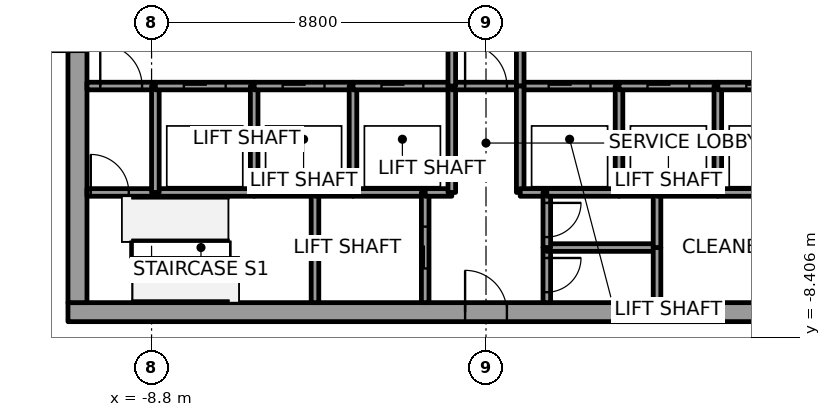
"""IFC4 building model, lengths in metres.
Left out: names, types, materials, properties, quantities, classifications, styles, units other than length and angle.
Written with IfcOpenShell. Run it as: python <this file> out.ifc"""

import sys

from ifc_helpers import new_model, si_unit, direction, frame, frame_2d, origin, place, context, subcontext, project, spatial, rectangle, extrude, element, fill, save


model = new_model("IFC4")
c1 = context("Model", 3, precision=1e-05, world=origin(), true_north=direction((0.0, 1.0)))
c2 = subcontext(c1, "Body", "Model", "MODEL_VIEW")
j1 = project(units=[si_unit("LENGTHUNIT", "METRE"), si_unit("PLANEANGLEUNIT", "RADIAN")], contexts=[c1])
p1 = place(None, origin())
s1 = spatial("IfcSite", under=j1, at=p1, CompositionType="ELEMENT")
p2 = place(p1, origin())
s2 = spatial("IfcBuilding", under=s1, at=p2, CompositionType="ELEMENT")
p3 = place(p2, frame((0.0, 0.0, 118.6)))
s3 = spatial("IfcBuildingStorey", under=s2, at=p3, CompositionType="ELEMENT", Elevation=118.6)
p4 = place(p3, frame((-11.0, -7.75, 0.0), z_axis=(0.0, 0.0, 1.0), x_axis=(1.0, 0.0, 0.0)))
e1 = element("IfcWall", 1, at=p4, inside=s3, PredefinedType="SHEAR", context=c2, shape_type="SweptSolid", body=[
    extrude(rectangle(XDim=22.0, YDim=0.5, at=frame_2d((11.0, 0.0))), origin(), (0.0, 0.0, 1.0), 7.2),
])
p5 = place(p4, frame((10.45, 0.0, 0.0)))
e2 = element("IfcOpeningElement", 2, at=p5, cuts=e1, PredefinedType="OPENING", context=c2, shape_type="SweptSolid", body=[
    extrude(rectangle(XDim=1.1, YDim=2.1, at=frame_2d((0.55, 1.05))), frame((0.0, 0.25, 0.0), z_axis=(0.0, -1.0, 0.0), x_axis=(1.0, 0.0, 0.0)), (0.0, 0.0, 1.0), 0.5),
])
p6 = place(p3, frame((-10.75, -7.5, 0.0), z_axis=(0.0, 0.0, 1.0), x_axis=(0.0, 1.0, 0.0)))
e3 = element("IfcWall", 3, at=p6, inside=s3, PredefinedType="SHEAR", context=c2, shape_type="SweptSolid", body=[
    extrude(rectangle(XDim=15.0, YDim=0.5, at=frame_2d((7.5, 0.0))), origin(), (0.0, 0.0, 1.0), 7.2),
])
p7 = place(p6, frame((6.6, 0.0, 0.0)))
e4 = element("IfcOpeningElement", 4, at=p7, cuts=e3, PredefinedType="OPENING", context=c2, shape_type="SweptSolid", body=[
    extrude(rectangle(XDim=1.8, YDim=2.1, at=frame_2d((0.9, 1.05))), frame((0.0, 0.25, 0.0), z_axis=(0.0, -1.0, 0.0), x_axis=(1.0, 0.0, 0.0)), (0.0, 0.0, 1.0), 0.5),
])
p8 = place(p3, frame((-10.5, -4.6, 0.0), z_axis=(0.0, 0.0, 1.0), x_axis=(1.0, 0.0, 0.0)))
e5 = element("IfcWall", 5, at=p8, inside=s3, PredefinedType="SOLIDWALL", context=c2, shape_type="SweptSolid", body=[
    extrude(rectangle(XDim=1.8, YDim=0.2, at=frame_2d((0.9, 0.0))), origin(), (0.0, 0.0, 1.0), 7.05),
])
p9 = place(p8, frame((0.1, 0.0, 0.0)))
e6 = element("IfcOpeningElement", 6, at=p9, cuts=e5, PredefinedType="OPENING", context=c2, shape_type="SweptSolid", body=[
    extrude(rectangle(XDim=1.0, YDim=2.1, at=frame_2d((0.5, 1.05))), frame((0.0, 0.1, 0.0), z_axis=(0.0, -1.0, 0.0), x_axis=(1.0, 0.0, 0.0)), (0.0, 0.0, 1.0), 0.2),
])
p10 = place(p3, frame((-10.5, -1.8, 0.0), z_axis=(0.0, 0.0, 1.0), x_axis=(1.0, 0.0, 0.0)))
e7 = element("IfcWall", 7, at=p10, inside=s3, PredefinedType="SOLIDWALL", context=c2, shape_type="SweptSolid", body=[
    extrude(rectangle(XDim=1.8, YDim=0.2, at=frame_2d((0.9, 0.0))), origin(), (0.0, 0.0, 1.0), 7.05),
])
p11 = place(p10, frame((0.35, 0.0, 0.0)))
e8 = element("IfcOpeningElement", 8, at=p11, cuts=e7, PredefinedType="OPENING", context=c2, shape_type="SweptSolid", body=[
    extrude(rectangle(XDim=1.1, YDim=2.1, at=frame_2d((0.55, 1.05))), frame((0.0, 0.1, 0.0), z_axis=(0.0, -1.0, 0.0), x_axis=(1.0, 0.0, 0.0)), (0.0, 0.0, 1.0), 0.2),
])
p12 = place(p3, frame((-8.7, -4.6, 0.0), z_axis=(0.0, 0.0, 1.0), x_axis=(1.0, 0.0, 0.0)))
e9 = element("IfcWall", 9, at=p12, inside=s3, PredefinedType="SOLIDWALL", context=c2, shape_type="SweptSolid", body=[
    extrude(rectangle(XDim=2.6, YDim=0.2, at=frame_2d((1.3, 0.0))), origin(), (0.0, 0.0, 1.0), 7.05),
])
p13 = place(p3, frame((-8.7, -4.6, 0.0), z_axis=(0.0, 0.0, 1.0), x_axis=(0.0, 1.0, 0.0)))
e10 = element("IfcWall", 10, at=p13, inside=s3, PredefinedType="SOLIDWALL", context=c2, shape_type="SweptSolid", body=[
    extrude(rectangle(XDim=2.8, YDim=0.2, at=frame_2d((1.4, 0.0))), origin(), (0.0, 0.0, 1.0), 7.05),
])
p14 = place(p3, frame((-8.7, -1.8, 0.0), z_axis=(0.0, 0.0, 1.0), x_axis=(1.0, 0.0, 0.0)))
e11 = element("IfcWall", 11, at=p14, inside=s3, PredefinedType="SOLIDWALL", context=c2, shape_type="SweptSolid", body=[
    extrude(rectangle(XDim=2.6, YDim=0.2, at=frame_2d((1.3, 0.0))), origin(), (0.0, 0.0, 1.0), 7.05),
])
p15 = place(p14, frame((0.75, 0.0, 0.0)))
e12 = element("IfcOpeningElement", 12, at=p15, cuts=e11, PredefinedType="OPENING", context=c2, shape_type="SweptSolid", body=[
    extrude(rectangle(XDim=1.1, YDim=2.1, at=frame_2d((0.55, 1.05))), frame((0.0, 0.1, 0.0), z_axis=(0.0, -1.0, 0.0), x_axis=(1.0, 0.0, 0.0)), (0.0, 0.0, 1.0), 0.2),
])
p16 = place(p3, frame((-6.1, -4.6, 0.0), z_axis=(0.0, 0.0, 1.0), x_axis=(1.0, 0.0, 0.0)))
e13 = element("IfcWall", 13, at=p16, inside=s3, PredefinedType="SOLIDWALL", context=c2, shape_type="SweptSolid", body=[
    extrude(rectangle(XDim=1.6, YDim=0.2, at=frame_2d((0.8, 0.0))), origin(), (0.0, 0.0, 1.0), 7.05),
])
p17 = place(p3, frame((-6.1, -4.6, 0.0), z_axis=(0.0, 0.0, 1.0), x_axis=(0.0, 1.0, 0.0)))
e14 = element("IfcWall", 14, at=p17, inside=s3, PredefinedType="SOLIDWALL", context=c2, shape_type="SweptSolid", body=[
    extrude(rectangle(XDim=2.8, YDim=0.2, at=frame_2d((1.4, 0.0))), origin(), (0.0, 0.0, 1.0), 7.05),
])
p18 = place(p3, frame((-6.1, -1.8, 0.0), z_axis=(0.0, 0.0, 1.0), x_axis=(1.0, 0.0, 0.0)))
e15 = element("IfcWall", 15, at=p18, inside=s3, PredefinedType="SOLIDWALL", context=c2, shape_type="SweptSolid", body=[
    extrude(rectangle(XDim=2.6, YDim=0.2, at=frame_2d((1.3, 0.0))), origin(), (0.0, 0.0, 1.0), 7.05),
])
p19 = place(p18, frame((0.75, 0.0, 0.0)))
e16 = element("IfcOpeningElement", 16, at=p19, cuts=e15, PredefinedType="OPENING", context=c2, shape_type="SweptSolid", body=[
    extrude(rectangle(XDim=1.1, YDim=2.1, at=frame_2d((0.55, 1.05))), frame((0.0, 0.1, 0.0), z_axis=(0.0, -1.0, 0.0), x_axis=(1.0, 0.0, 0.0)), (0.0, 0.0, 1.0), 0.2),
])
p20 = place(p3, frame((-4.5, -4.6, 0.0), z_axis=(0.0, 0.0, 1.0), x_axis=(0.0, -1.0, 0.0)))
e17 = element("IfcWall", 17, at=p20, inside=s3, PredefinedType="SOLIDWALL", context=c2, shape_type="SweptSolid", body=[
    extrude(rectangle(XDim=2.9, YDim=0.2, at=frame_2d((1.45, 0.0))), origin(), (0.0, 0.0, 1.0), 7.05),
])
p21 = place(p3, frame((-4.5, -4.6, 0.0), z_axis=(0.0, 0.0, 1.0), x_axis=(1.0, 0.0, 0.0)))
e18 = element("IfcWall", 18, at=p21, inside=s3, PredefinedType="SOLIDWALL", context=c2, shape_type="SweptSolid", body=[
    extrude(rectangle(XDim=1.0, YDim=0.2, at=frame_2d((0.5, 0.0))), origin(), (0.0, 0.0, 1.0), 7.05),
])
p22 = place(p3, frame((-3.5, -4.6, 0.0), z_axis=(0.0, 0.0, 1.0), x_axis=(1.0, 0.0, 0.0)))
e19 = element("IfcWall", 19, at=p22, inside=s3, PredefinedType="SOLIDWALL", context=c2, shape_type="SweptSolid", body=[
    extrude(rectangle(XDim=1.9, YDim=0.2, at=frame_2d((0.95, 0.0))), origin(), (0.0, 0.0, 1.0), 7.05),
])
p23 = place(p3, frame((-3.5, -4.6, 0.0), z_axis=(0.0, 0.0, 1.0), x_axis=(0.0, 1.0, 0.0)))
e20 = element("IfcWall", 20, at=p23, inside=s3, PredefinedType="SOLIDWALL", context=c2, shape_type="SweptSolid", body=[
    extrude(rectangle(XDim=2.8, YDim=0.2, at=frame_2d((1.4, 0.0))), origin(), (0.0, 0.0, 1.0), 7.05),
])
p24 = place(p3, frame((-3.5, -1.8, 0.0), z_axis=(0.0, 0.0, 1.0), x_axis=(1.0, 0.0, 0.0)))
e21 = element("IfcWall", 21, at=p24, inside=s3, PredefinedType="SOLIDWALL", context=c2, shape_type="SweptSolid", body=[
    extrude(rectangle(XDim=2.6, YDim=0.2, at=frame_2d((1.3, 0.0))), origin(), (0.0, 0.0, 1.0), 7.05),
])
p25 = place(p24, frame((0.75, 0.0, 0.0)))
e22 = element("IfcOpeningElement", 22, at=p25, cuts=e21, PredefinedType="OPENING", context=c2, shape_type="SweptSolid", body=[
    extrude(rectangle(XDim=1.1, YDim=2.1, at=frame_2d((0.55, 1.05))), frame((0.0, 0.1, 0.0), z_axis=(0.0, -1.0, 0.0), x_axis=(1.0, 0.0, 0.0)), (0.0, 0.0, 1.0), 0.2),
])
p26 = place(p3, frame((-1.6, -7.5, 0.0), z_axis=(0.0, 0.0, 1.0), x_axis=(0.0, 1.0, 0.0)))
e23 = element("IfcWall", 23, at=p26, inside=s3, PredefinedType="SOLIDWALL", context=c2, shape_type="SweptSolid", body=[
    extrude(rectangle(XDim=2.9, YDim=0.2, at=frame_2d((1.45, 0.0))), origin(), (0.0, 0.0, 1.0), 7.05),
])
p27 = place(p26, frame((0.9, 0.0, 0.0)))
e24 = element("IfcOpeningElement", 24, at=p27, cuts=e23, PredefinedType="OPENING", context=c2, shape_type="SweptSolid", body=[
    extrude(rectangle(XDim=1.1, YDim=2.1, at=frame_2d((0.55, 1.05))), frame((0.0, 0.1, 0.0), z_axis=(0.0, -1.0, 0.0), x_axis=(1.0, 0.0, 0.0)), (0.0, 0.0, 1.0), 0.2),
])
p28 = place(p3, frame((-1.6, -4.6, 0.0), z_axis=(0.0, 0.0, 1.0), x_axis=(1.0, 0.0, 0.0)))
e25 = element("IfcWall", 25, at=p28, inside=s3, PredefinedType="SOLIDWALL", context=c2, shape_type="SweptSolid", body=[
    extrude(rectangle(XDim=0.7, YDim=0.2, at=frame_2d((0.35, 0.0))), origin(), (0.0, 0.0, 1.0), 7.05),
])
p29 = place(p3, frame((-0.9, -4.6, 0.0), z_axis=(0.0, 0.0, 1.0), x_axis=(0.0, 1.0, 0.0)))
e26 = element("IfcWall", 26, at=p29, inside=s3, PredefinedType="SOLIDWALL", context=c2, shape_type="SweptSolid", body=[
    extrude(rectangle(XDim=2.8, YDim=0.2, at=frame_2d((1.4, 0.0))), origin(), (0.0, 0.0, 1.0), 7.05),
])
p30 = place(p3, frame((-0.9, -1.8, 0.0), z_axis=(0.0, 0.0, 1.0), x_axis=(1.0, 0.0, 0.0)))
e27 = element("IfcWall", 27, at=p30, inside=s3, PredefinedType="SOLIDWALL", context=c2, shape_type="SweptSolid", body=[
    extrude(rectangle(XDim=1.8, YDim=0.2, at=frame_2d((0.9, 0.0))), origin(), (0.0, 0.0, 1.0), 7.05),
])
p31 = place(p30, frame((0.35, 0.0, 0.0)))
e28 = element("IfcOpeningElement", 28, at=p31, cuts=e27, PredefinedType="OPENING", context=c2, shape_type="SweptSolid", body=[
    extrude(rectangle(XDim=1.1, YDim=2.1, at=frame_2d((0.55, 1.05))), frame((0.0, 0.1, 0.0), z_axis=(0.0, -1.0, 0.0), x_axis=(1.0, 0.0, 0.0)), (0.0, 0.0, 1.0), 0.2),
])
p32 = place(p3, frame((-0.9, 1.8, 0.0), z_axis=(0.0, 0.0, 1.0), x_axis=(0.0, -1.0, 0.0)))
e29 = element("IfcWall", 29, at=p32, inside=s3, PredefinedType="SOLIDWALL", context=c2, shape_type="SweptSolid", body=[
    extrude(rectangle(XDim=3.6, YDim=0.2, at=frame_2d((1.8, 0.0))), origin(), (0.0, 0.0, 1.0), 7.05),
])
p33 = place(p32, frame((1.05, 0.0, 0.0)))
e30 = element("IfcOpeningElement", 30, at=p33, cuts=e29, PredefinedType="OPENING", context=c2, shape_type="SweptSolid", body=[
    extrude(rectangle(XDim=1.5, YDim=2.1, at=frame_2d((0.75, 1.05))), frame((0.0, 0.1, 0.0), z_axis=(0.0, -1.0, 0.0), x_axis=(1.0, 0.0, 0.0)), (0.0, 0.0, 1.0), 0.2),
])
p34 = place(p3, frame((0.9, -1.8, 0.0), z_axis=(0.0, 0.0, 1.0), x_axis=(1.0, 0.0, 0.0)))
e31 = element("IfcWall", 31, at=p34, inside=s3, PredefinedType="SOLIDWALL", context=c2, shape_type="SweptSolid", body=[
    extrude(rectangle(XDim=2.6, YDim=0.2, at=frame_2d((1.3, 0.0))), origin(), (0.0, 0.0, 1.0), 7.05),
])
p35 = place(p34, frame((0.75, 0.0, 0.0)))
e32 = element("IfcOpeningElement", 32, at=p35, cuts=e31, PredefinedType="OPENING", context=c2, shape_type="SweptSolid", body=[
    extrude(rectangle(XDim=1.1, YDim=2.1, at=frame_2d((0.55, 1.05))), frame((0.0, 0.1, 0.0), z_axis=(0.0, -1.0, 0.0), x_axis=(1.0, 0.0, 0.0)), (0.0, 0.0, 1.0), 0.2),
])
p36 = place(p3, frame((0.9, -1.8, 0.0), z_axis=(0.0, 0.0, 1.0), x_axis=(0.0, 1.0, 0.0)))
e33 = element("IfcWall", 33, at=p36, inside=s3, PredefinedType="SOLIDWALL", context=c2, shape_type="SweptSolid", body=[
    extrude(rectangle(XDim=3.6, YDim=0.2, at=frame_2d((1.8, 0.0))), origin(), (0.0, 0.0, 1.0), 7.05),
])
p37 = place(p36, frame((1.05, 0.0, 0.0)))
e34 = element("IfcOpeningElement", 34, at=p37, cuts=e33, PredefinedType="OPENING", context=c2, shape_type="SweptSolid", body=[
    extrude(rectangle(XDim=1.5, YDim=2.1, at=frame_2d((0.75, 1.05))), frame((0.0, 0.1, 0.0), z_axis=(0.0, -1.0, 0.0), x_axis=(1.0, 0.0, 0.0)), (0.0, 0.0, 1.0), 0.2),
])
p38 = place(p3, frame((0.9, -1.8, 0.0), z_axis=(0.0, 0.0, 1.0), x_axis=(0.0, -1.0, 0.0)))
e35 = element("IfcWall", 35, at=p38, inside=s3, PredefinedType="SOLIDWALL", context=c2, shape_type="SweptSolid", body=[
    extrude(rectangle(XDim=2.8, YDim=0.2, at=frame_2d((1.4, 0.0))), origin(), (0.0, 0.0, 1.0), 7.05),
])
p39 = place(p3, frame((0.9, -4.6, 0.0), z_axis=(0.0, 0.0, 1.0), x_axis=(1.0, 0.0, 0.0)))
e36 = element("IfcWall", 36, at=p39, inside=s3, PredefinedType="SOLIDWALL", context=c2, shape_type="SweptSolid", body=[
    extrude(rectangle(XDim=0.7, YDim=0.2, at=frame_2d((0.35, 0.0))), origin(), (0.0, 0.0, 1.0), 7.05),
])
p40 = place(p3, frame((1.6, -6.05, 0.0), z_axis=(0.0, 0.0, 1.0), x_axis=(0.0, -1.0, 0.0)))
e37 = element("IfcWall", 37, at=p40, inside=s3, PredefinedType="SOLIDWALL", context=c2, shape_type="SweptSolid", body=[
    extrude(rectangle(XDim=1.45, YDim=0.2, at=frame_2d((0.725, 0.0))), origin(), (0.0, 0.0, 1.0), 7.05),
])
p41 = place(p40, frame((0.275, 0.0, 0.0)))
e38 = element("IfcOpeningElement", 38, at=p41, cuts=e37, PredefinedType="OPENING", context=c2, shape_type="SweptSolid", body=[
    extrude(rectangle(XDim=0.9, YDim=2.1, at=frame_2d((0.45, 1.05))), frame((0.0, 0.1, 0.0), z_axis=(0.0, -1.0, 0.0), x_axis=(1.0, 0.0, 0.0)), (0.0, 0.0, 1.0), 0.2),
])
p42 = place(p3, frame((4.5, -6.05, 0.0), z_axis=(0.0, 0.0, 1.0), x_axis=(-1.0, 0.0, 0.0)))
e39 = element("IfcWall", 39, at=p42, inside=s3, PredefinedType="SOLIDWALL", context=c2, shape_type="SweptSolid", body=[
    extrude(rectangle(XDim=2.9, YDim=0.2, at=frame_2d((1.45, 0.0))), origin(), (0.0, 0.0, 1.0), 7.05),
])
p43 = place(p3, frame((1.6, -4.6, 0.0), z_axis=(0.0, 0.0, 1.0), x_axis=(0.0, -1.0, 0.0)))
e40 = element("IfcWall", 40, at=p43, inside=s3, PredefinedType="SOLIDWALL", context=c2, shape_type="SweptSolid", body=[
    extrude(rectangle(XDim=1.45, YDim=0.2, at=frame_2d((0.725, 0.0))), origin(), (0.0, 0.0, 1.0), 7.05),
])
p44 = place(p43, frame((0.275, 0.0, 0.0)))
e41 = element("IfcOpeningElement", 41, at=p44, cuts=e40, PredefinedType="OPENING", context=c2, shape_type="SweptSolid", body=[
    extrude(rectangle(XDim=0.9, YDim=2.1, at=frame_2d((0.45, 1.05))), frame((0.0, 0.1, 0.0), z_axis=(0.0, -1.0, 0.0), x_axis=(1.0, 0.0, 0.0)), (0.0, 0.0, 1.0), 0.2),
])
p45 = place(p3, frame((3.5, -4.6, 0.0), z_axis=(0.0, 0.0, 1.0), x_axis=(-1.0, 0.0, 0.0)))
e42 = element("IfcWall", 42, at=p45, inside=s3, PredefinedType="SOLIDWALL", context=c2, shape_type="SweptSolid", body=[
    extrude(rectangle(XDim=1.9, YDim=0.2, at=frame_2d((0.95, 0.0))), origin(), (0.0, 0.0, 1.0), 7.05),
])
p46 = place(p3, frame((4.5, -4.6, 0.0), z_axis=(0.0, 0.0, 1.0), x_axis=(-1.0, 0.0, 0.0)))
e43 = element("IfcWall", 43, at=p46, inside=s3, PredefinedType="SOLIDWALL", context=c2, shape_type="SweptSolid", body=[
    extrude(rectangle(XDim=1.0, YDim=0.2, at=frame_2d((0.5, 0.0))), origin(), (0.0, 0.0, 1.0), 7.05),
])
p47 = place(p3, frame((3.5, -4.6, 0.0), z_axis=(0.0, 0.0, 1.0), x_axis=(0.0, 1.0, 0.0)))
e44 = element("IfcWall", 44, at=p47, inside=s3, PredefinedType="SOLIDWALL", context=c2, shape_type="SweptSolid", body=[
    extrude(rectangle(XDim=2.8, YDim=0.2, at=frame_2d((1.4, 0.0))), origin(), (0.0, 0.0, 1.0), 7.05),
])
p48 = place(p3, frame((3.5, -1.8, 0.0), z_axis=(0.0, 0.0, 1.0), x_axis=(1.0, 0.0, 0.0)))
e45 = element("IfcWall", 45, at=p48, inside=s3, PredefinedType="SOLIDWALL", context=c2, shape_type="SweptSolid", body=[
    extrude(rectangle(XDim=2.6, YDim=0.2, at=frame_2d((1.3, 0.0))), origin(), (0.0, 0.0, 1.0), 7.05),
])
p49 = place(p48, frame((0.75, 0.0, 0.0)))
e46 = element("IfcOpeningElement", 46, at=p49, cuts=e45, PredefinedType="OPENING", context=c2, shape_type="SweptSolid", body=[
    extrude(rectangle(XDim=1.1, YDim=2.1, at=frame_2d((0.55, 1.05))), frame((0.0, 0.1, 0.0), z_axis=(0.0, -1.0, 0.0), x_axis=(1.0, 0.0, 0.0)), (0.0, 0.0, 1.0), 0.2),
])
for number, where, z_axis, x_axis in (
    (47, (4.5, -6.05, 0.0), (0.0, 0.0, 1.0), (0.0, -1.0, 0.0)),
    (48, (4.5, -4.6, 0.0), (0.0, 0.0, 1.0), (0.0, -1.0, 0.0)),
):
    element("IfcWall", number, at=place(p3, frame(where, z_axis=z_axis, x_axis=x_axis)), inside=s3, PredefinedType="SOLIDWALL", context=c2, shape_type="SweptSolid", body=[
        extrude(rectangle(XDim=1.45, YDim=0.2, at=frame_2d((0.725, 0.0))), origin(), (0.0, 0.0, 1.0), 7.05),
    ])
p50 = place(p3, frame((6.1, -4.6, 0.0), z_axis=(0.0, 0.0, 1.0), x_axis=(-1.0, 0.0, 0.0)))
e49 = element("IfcWall", 49, at=p50, inside=s3, PredefinedType="SOLIDWALL", context=c2, shape_type="SweptSolid", body=[
    extrude(rectangle(XDim=1.6, YDim=0.2, at=frame_2d((0.8, 0.0))), origin(), (0.0, 0.0, 1.0), 7.05),
])
p51 = place(p3, frame((8.7, -4.6, 0.0), z_axis=(0.0, 0.0, 1.0), x_axis=(-1.0, 0.0, 0.0)))
e50 = element("IfcWall", 50, at=p51, inside=s3, PredefinedType="SOLIDWALL", context=c2, shape_type="SweptSolid", body=[
    extrude(rectangle(XDim=2.6, YDim=0.2, at=frame_2d((1.3, 0.0))), origin(), (0.0, 0.0, 1.0), 7.05),
])
p52 = place(p3, frame((6.1, -4.6, 0.0), z_axis=(0.0, 0.0, 1.0), x_axis=(0.0, 1.0, 0.0)))
e51 = element("IfcWall", 51, at=p52, inside=s3, PredefinedType="SOLIDWALL", context=c2, shape_type="SweptSolid", body=[
    extrude(rectangle(XDim=2.8, YDim=0.2, at=frame_2d((1.4, 0.0))), origin(), (0.0, 0.0, 1.0), 7.05),
])
p53 = place(p3, frame((6.1, -1.8, 0.0), z_axis=(0.0, 0.0, 1.0), x_axis=(1.0, 0.0, 0.0)))
e52 = element("IfcWall", 52, at=p53, inside=s3, PredefinedType="SOLIDWALL", context=c2, shape_type="SweptSolid", body=[
    extrude(rectangle(XDim=2.6, YDim=0.2, at=frame_2d((1.3, 0.0))), origin(), (0.0, 0.0, 1.0), 7.05),
])
p54 = place(p53, frame((0.75, 0.0, 0.0)))
e53 = element("IfcOpeningElement", 53, at=p54, cuts=e52, PredefinedType="OPENING", context=c2, shape_type="SweptSolid", body=[
    extrude(rectangle(XDim=1.1, YDim=2.1, at=frame_2d((0.55, 1.05))), frame((0.0, 0.1, 0.0), z_axis=(0.0, -1.0, 0.0), x_axis=(1.0, 0.0, 0.0)), (0.0, 0.0, 1.0), 0.2),
])
p55 = place(p15, origin())
e54 = element("IfcDoor", 54, at=p55, inside=s3, OperationType="SLIDING_TO_LEFT", PredefinedType="DOOR", context=c2, shape_type="SweptSolid", body=[
    extrude(rectangle(XDim=1.1, YDim=2.1, at=frame_2d((0.55, 1.05))), frame((0.0, 0.025, 0.0), z_axis=(0.0, -1.0, 0.0), x_axis=(1.0, 0.0, 0.0)), (0.0, 0.0, 1.0), 0.05),
])
fill(e12, e54)
p56 = place(p19, origin())
e55 = element("IfcDoor", 55, at=p56, inside=s3, OperationType="SLIDING_TO_RIGHT", PredefinedType="DOOR", context=c2, shape_type="SweptSolid", body=[
    extrude(rectangle(XDim=1.1, YDim=2.1, at=frame_2d((0.55, 1.05))), frame((0.0, 0.025, 0.0), z_axis=(0.0, -1.0, 0.0), x_axis=(1.0, 0.0, 0.0)), (0.0, 0.0, 1.0), 0.05),
])
fill(e16, e55)
p57 = place(p25, origin())
e56 = element("IfcDoor", 56, at=p57, inside=s3, OperationType="SLIDING_TO_LEFT", PredefinedType="DOOR", context=c2, shape_type="SweptSolid", body=[
    extrude(rectangle(XDim=1.1, YDim=2.1, at=frame_2d((0.55, 1.05))), frame((0.0, 0.025, 0.0), z_axis=(0.0, -1.0, 0.0), x_axis=(1.0, 0.0, 0.0)), (0.0, 0.0, 1.0), 0.05),
])
fill(e22, e56)
p58 = place(p35, origin())
e57 = element("IfcDoor", 57, at=p58, inside=s3, OperationType="SLIDING_TO_LEFT", PredefinedType="DOOR", context=c2, shape_type="SweptSolid", body=[
    extrude(rectangle(XDim=1.1, YDim=2.1, at=frame_2d((0.55, 1.05))), frame((0.0, 0.025, 0.0), z_axis=(0.0, -1.0, 0.0), x_axis=(1.0, 0.0, 0.0)), (0.0, 0.0, 1.0), 0.05),
])
fill(e32, e57)
p59 = place(p49, origin())
e58 = element("IfcDoor", 58, at=p59, inside=s3, OperationType="SLIDING_TO_RIGHT", PredefinedType="DOOR", context=c2, shape_type="SweptSolid", body=[
    extrude(rectangle(XDim=1.1, YDim=2.1, at=frame_2d((0.55, 1.05))), frame((0.0, 0.025, 0.0), z_axis=(0.0, -1.0, 0.0), x_axis=(1.0, 0.0, 0.0)), (0.0, 0.0, 1.0), 0.05),
])
fill(e46, e58)
p60 = place(p54, origin())
e59 = element("IfcDoor", 59, at=p60, inside=s3, OperationType="SLIDING_TO_RIGHT", PredefinedType="DOOR", context=c2, shape_type="SweptSolid", body=[
    extrude(rectangle(XDim=1.1, YDim=2.1, at=frame_2d((0.55, 1.05))), frame((0.0, 0.025, 0.0), z_axis=(0.0, -1.0, 0.0), x_axis=(1.0, 0.0, 0.0)), (0.0, 0.0, 1.0), 0.05),
])
fill(e53, e59)
p61 = place(p27, origin())
e60 = element("IfcDoor", 60, at=p61, inside=s3, OperationType="SLIDING_TO_RIGHT", PredefinedType="DOOR", context=c2, shape_type="SweptSolid", body=[
    extrude(rectangle(XDim=1.1, YDim=2.1, at=frame_2d((0.55, 1.05))), frame((0.0, 0.025, 0.0), z_axis=(0.0, -1.0, 0.0), x_axis=(1.0, 0.0, 0.0)), (0.0, 0.0, 1.0), 0.05),
])
fill(e24, e60)
p62 = place(p11, origin())
e61 = element("IfcDoor", 61, at=p62, inside=s3, OperationType="SINGLE_SWING_RIGHT", PredefinedType="DOOR", context=c2, shape_type="SweptSolid", body=[
    extrude(rectangle(XDim=1.1, YDim=2.1, at=frame_2d((0.55, 1.05))), frame((0.0, 0.025, 0.0), z_axis=(0.0, -1.0, 0.0), x_axis=(1.0, 0.0, 0.0)), (0.0, 0.0, 1.0), 0.05),
])
fill(e8, e61)
p63 = place(p31, origin())
e62 = element("IfcDoor", 62, at=p63, inside=s3, OperationType="SINGLE_SWING_LEFT", PredefinedType="DOOR", context=c2, shape_type="SweptSolid", body=[
    extrude(rectangle(XDim=1.1, YDim=2.1, at=frame_2d((0.55, 1.05))), frame((0.0, 0.025, 0.0), z_axis=(0.0, -1.0, 0.0), x_axis=(1.0, 0.0, 0.0)), (0.0, 0.0, 1.0), 0.05),
])
fill(e28, e62)
p64 = place(p9, origin())
e63 = element("IfcDoor", 63, at=p64, inside=s3, OperationType="SINGLE_SWING_LEFT", PredefinedType="DOOR", context=c2, shape_type="SweptSolid", body=[
    extrude(rectangle(XDim=1.0, YDim=2.1, at=frame_2d((0.5, 1.05))), frame((0.0, 0.025, 0.0), z_axis=(0.0, -1.0, 0.0), x_axis=(1.0, 0.0, 0.0)), (0.0, 0.0, 1.0), 0.05),
])
fill(e6, e63)
p65 = place(p41, origin())
e64 = element("IfcDoor", 64, at=p65, inside=s3, OperationType="SINGLE_SWING_LEFT", PredefinedType="DOOR", context=c2, shape_type="SweptSolid", body=[
    extrude(rectangle(XDim=0.9, YDim=2.1, at=frame_2d((0.45, 1.05))), frame((0.0, 0.025, 0.0), z_axis=(0.0, -1.0, 0.0), x_axis=(1.0, 0.0, 0.0)), (0.0, 0.0, 1.0), 0.05),
])
fill(e38, e64)
p66 = place(p44, origin())
e65 = element("IfcDoor", 65, at=p66, inside=s3, OperationType="SINGLE_SWING_LEFT", PredefinedType="DOOR", context=c2, shape_type="SweptSolid", body=[
    extrude(rectangle(XDim=0.9, YDim=2.1, at=frame_2d((0.45, 1.05))), frame((0.0, 0.025, 0.0), z_axis=(0.0, -1.0, 0.0), x_axis=(1.0, 0.0, 0.0)), (0.0, 0.0, 1.0), 0.05),
])
fill(e41, e65)
p67 = place(p7, origin())
e66 = element("IfcDoor", 66, at=p67, inside=s3, OperationType="DOUBLE_DOOR_SINGLE_SWING", PredefinedType="DOOR", context=c2, shape_type="SweptSolid", body=[
    extrude(rectangle(XDim=1.8, YDim=2.1, at=frame_2d((0.9, 1.05))), frame((0.0, 0.025, 0.0), z_axis=(0.0, -1.0, 0.0), x_axis=(1.0, 0.0, 0.0)), (0.0, 0.0, 1.0), 0.05),
])
fill(e4, e66)
p68 = place(p5, origin())
e67 = element("IfcDoor", 67, at=p68, inside=s3, OperationType="SINGLE_SWING_LEFT", PredefinedType="DOOR", context=c2, shape_type="SweptSolid", body=[
    extrude(rectangle(XDim=1.1, YDim=2.1, at=frame_2d((0.55, 1.05))), frame((0.0, 0.025, 0.0), z_axis=(0.0, -1.0, 0.0), x_axis=(1.0, 0.0, 0.0)), (0.0, 0.0, 1.0), 0.05),
])
fill(e2, e67)
save(model, sys.argv[1])
